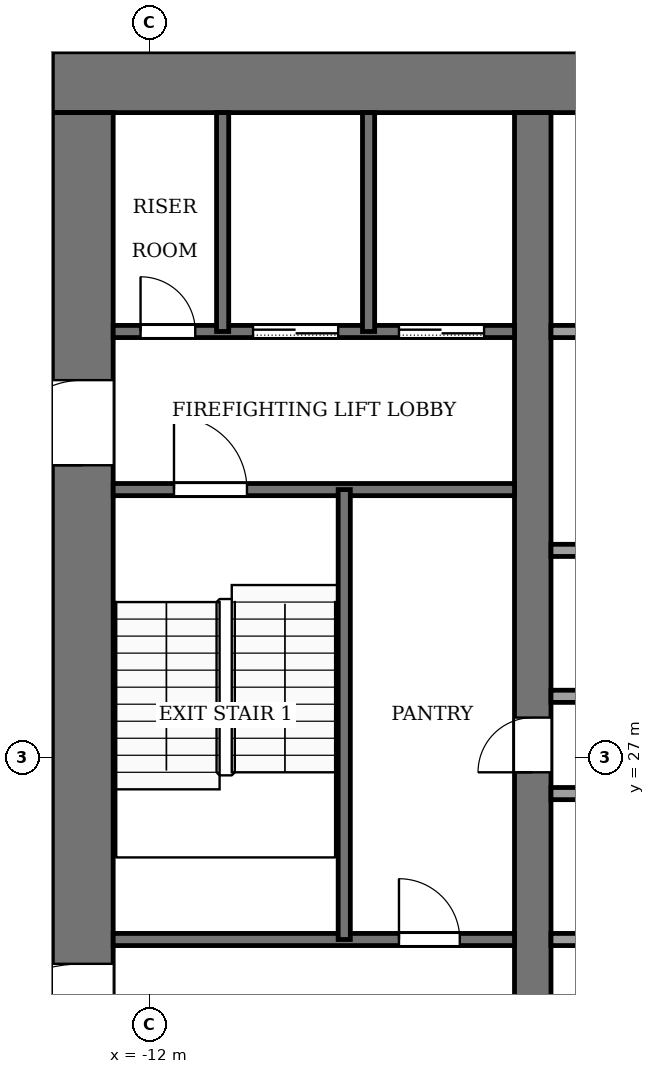
"""IFC4 building model, lengths in metres.
Left out: names, types, materials, properties, quantities, classifications, styles, units other than length and angle.
Written with IfcOpenShell. Run it as: python <this file> out.ifc"""

import sys

from ifc_helpers import new_model, si_unit, direction, frame, frame_2d, origin, place, context, subcontext, project, spatial, rectangle, extrude, element, fill, save


model = new_model("IFC4")
c1 = context("Model", 3, precision=1e-05, world=origin(), true_north=direction((0.0, 1.0)))
c2 = subcontext(c1, "Body", "Model", "MODEL_VIEW")
j1 = project(units=[si_unit("LENGTHUNIT", "METRE"), si_unit("PLANEANGLEUNIT", "RADIAN")], contexts=[c1])
p1 = place(None, origin())
s1 = spatial("IfcSite", under=j1, at=p1, CompositionType="ELEMENT")
p2 = place(p1, origin())
s2 = spatial("IfcBuilding", under=s1, at=p2, CompositionType="ELEMENT")
p3 = place(p2, frame((0.0, 0.0, 142.0)))
s3 = spatial("IfcBuildingStorey", under=s2, at=p3, CompositionType="ELEMENT", Elevation=142.0)
p4 = place(p3, frame((-13.6, 38.1, -0.13), z_axis=(0.0, 0.0, 1.0), x_axis=(1.0, 0.0, 0.0)))
e1 = element("IfcWall", 1, at=p4, inside=s3, PredefinedType="SHEAR", context=c2, shape_type="SweptSolid", body=[
    extrude(rectangle(XDim=27.2, YDim=1.0, at=frame_2d((13.6, 0.0))), origin(), (0.0, 0.0, 1.0), 4.0),
])
p5 = place(p3, frame((-13.1, 18.4, -0.13), z_axis=(0.0, 0.0, 1.0), x_axis=(0.0, 1.0, 0.0)))
e2 = element("IfcWall", 2, at=p5, inside=s3, PredefinedType="SHEAR", context=c2, shape_type="SweptSolid", body=[
    extrude(rectangle(XDim=19.2, YDim=1.0, at=frame_2d((9.6, 0.0))), origin(), (0.0, 0.0, 1.0), 4.0),
])
p6 = place(p5, frame((2.8, 0.0, 0.13)))
e3 = element("IfcOpeningElement", 3, at=p6, cuts=e2, PredefinedType="OPENING", context=c2, shape_type="SweptSolid", body=[
    extrude(rectangle(XDim=2.4, YDim=2.4, at=frame_2d((1.2, 1.2))), frame((0.0, 0.51, 0.0), z_axis=(0.0, -1.0, 0.0), x_axis=(1.0, 0.0, 0.0)), (0.0, 0.0, 1.0), 1.02),
])
p7 = place(p5, frame((13.4, 0.0, 0.13)))
e4 = element("IfcOpeningElement", 4, at=p7, cuts=e2, PredefinedType="OPENING", context=c2, shape_type="SweptSolid", body=[
    extrude(rectangle(XDim=1.4, YDim=2.2, at=frame_2d((0.7, 1.1))), frame((0.0, 0.51, 0.0), z_axis=(0.0, -1.0, 0.0), x_axis=(1.0, 0.0, 0.0)), (0.0, 0.0, 1.0), 1.02),
])
p8 = place(p3, frame((-5.7, 18.4, -0.13), z_axis=(0.0, 0.0, 1.0), x_axis=(0.0, 1.0, 0.0)))
e5 = element("IfcWall", 5, at=p8, inside=s3, PredefinedType="SHEAR", context=c2, shape_type="SweptSolid", body=[
    extrude(rectangle(XDim=19.2, YDim=0.6, at=frame_2d((9.6, 0.0))), origin(), (0.0, 0.0, 1.0), 4.0),
])
p9 = place(p8, frame((8.35, 0.0, 0.13)))
e6 = element("IfcOpeningElement", 6, at=p9, cuts=e5, PredefinedType="OPENING", context=c2, shape_type="SweptSolid", body=[
    extrude(rectangle(XDim=0.9, YDim=2.1, at=frame_2d((0.45, 1.05))), frame((0.0, 0.31, 0.0), z_axis=(0.0, -1.0, 0.0), x_axis=(1.0, 0.0, 0.0)), (0.0, 0.0, 1.0), 0.62),
])
p10 = place(p3, frame((-12.6, 24.0, 0.0), z_axis=(0.0, 0.0, 1.0), x_axis=(1.0, 0.0, 0.0)))
e7 = element("IfcWall", 7, at=p10, inside=s3, PredefinedType="PARTITIONING", context=c2, shape_type="SweptSolid", body=[
    extrude(rectangle(XDim=6.6, YDim=0.2, at=frame_2d((3.3, 0.0))), origin(), (0.0, 0.0, 1.0), 3.87),
])
p11 = place(p10, frame((4.7, 0.0, 0.0)))
e8 = element("IfcOpeningElement", 8, at=p11, cuts=e7, PredefinedType="OPENING", context=c2, shape_type="SweptSolid", body=[
    extrude(rectangle(XDim=1.0, YDim=2.1, at=frame_2d((0.5, 1.05))), frame((0.0, 0.11, 0.0), z_axis=(0.0, -1.0, 0.0), x_axis=(1.0, 0.0, 0.0)), (0.0, 0.0, 1.0), 0.22),
])
p12 = place(p3, frame((-5.4, 24.0, 0.0), z_axis=(0.0, 0.0, 1.0), x_axis=(1.0, 0.0, 0.0)))
e9 = element("IfcWall", 9, at=p12, inside=s3, PredefinedType="PARTITIONING", context=c2, shape_type="SweptSolid", body=[
    extrude(rectangle(XDim=10.8, YDim=0.2, at=frame_2d((5.4, 0.0))), origin(), (0.0, 0.0, 1.0), 3.87),
])
p13 = place(p12, frame((0.75, 0.0, 0.0)))
e10 = element("IfcOpeningElement", 10, at=p13, cuts=e9, PredefinedType="OPENING", context=c2, shape_type="SweptSolid", body=[
    extrude(rectangle(XDim=1.2, YDim=2.2, at=frame_2d((0.6, 1.1))), frame((0.0, 0.11, 0.0), z_axis=(0.0, -1.0, 0.0), x_axis=(1.0, 0.0, 0.0)), (0.0, 0.0, 1.0), 0.22),
])
p14 = place(p12, frame((3.45, 0.0, 0.0)))
e11 = element("IfcOpeningElement", 11, at=p14, cuts=e9, PredefinedType="OPENING", context=c2, shape_type="SweptSolid", body=[
    extrude(rectangle(XDim=1.2, YDim=2.2, at=frame_2d((0.6, 1.1))), frame((0.0, 0.11, 0.0), z_axis=(0.0, -1.0, 0.0), x_axis=(1.0, 0.0, 0.0)), (0.0, 0.0, 1.0), 0.22),
])
p15 = place(p12, frame((6.15, 0.0, 0.0)))
e12 = element("IfcOpeningElement", 12, at=p15, cuts=e9, PredefinedType="OPENING", context=c2, shape_type="SweptSolid", body=[
    extrude(rectangle(XDim=1.2, YDim=2.2, at=frame_2d((0.6, 1.1))), frame((0.0, 0.11, 0.0), z_axis=(0.0, -1.0, 0.0), x_axis=(1.0, 0.0, 0.0)), (0.0, 0.0, 1.0), 0.22),
])
p16 = place(p12, frame((8.85, 0.0, 0.0)))
e13 = element("IfcOpeningElement", 13, at=p16, cuts=e9, PredefinedType="OPENING", context=c2, shape_type="SweptSolid", body=[
    extrude(rectangle(XDim=1.2, YDim=2.2, at=frame_2d((0.6, 1.1))), frame((0.0, 0.11, 0.0), z_axis=(0.0, -1.0, 0.0), x_axis=(1.0, 0.0, 0.0)), (0.0, 0.0, 1.0), 0.22),
])
for number, where, z_axis, x_axis in (
    (14, (-5.4, 26.4, 0.0), (0.0, 0.0, 1.0), (1.0, 0.0, 0.0)),
    (15, (-5.4, 28.0, 0.0), (0.0, 0.0, 1.0), (1.0, 0.0, 0.0)),
    (16, (-5.4, 30.4, 0.0), (0.0, 0.0, 1.0), (1.0, 0.0, 0.0)),
):
    element("IfcWall", number, at=place(p3, frame(where, z_axis=z_axis, x_axis=x_axis)), inside=s3, PredefinedType="PARTITIONING", context=c2, shape_type="SweptSolid", body=[
        extrude(rectangle(XDim=10.8, YDim=0.2, at=frame_2d((5.4, 0.0))), origin(), (0.0, 0.0, 1.0), 3.87),
    ])
p17 = place(p3, frame((-12.6, 31.4, 0.0), z_axis=(0.0, 0.0, 1.0), x_axis=(1.0, 0.0, 0.0)))
e17 = element("IfcWall", 17, at=p17, inside=s3, PredefinedType="PARTITIONING", context=c2, shape_type="SweptSolid", body=[
    extrude(rectangle(XDim=6.6, YDim=0.2, at=frame_2d((3.3, 0.0))), origin(), (0.0, 0.0, 1.0), 3.87),
])
p18 = place(p17, frame((1.0, 0.0, 0.0)))
e18 = element("IfcOpeningElement", 18, at=p18, cuts=e17, PredefinedType="OPENING", context=c2, shape_type="SweptSolid", body=[
    extrude(rectangle(XDim=1.2, YDim=2.2, at=frame_2d((0.6, 1.1))), frame((0.0, 0.11, 0.0), z_axis=(0.0, -1.0, 0.0), x_axis=(1.0, 0.0, 0.0)), (0.0, 0.0, 1.0), 0.22),
])
p19 = place(p3, frame((-12.6, 34.0, 0.0), z_axis=(0.0, 0.0, 1.0), x_axis=(1.0, 0.0, 0.0)))
e19 = element("IfcWall", 19, at=p19, inside=s3, PredefinedType="PARTITIONING", context=c2, shape_type="SweptSolid", body=[
    extrude(rectangle(XDim=6.6, YDim=0.2, at=frame_2d((3.3, 0.0))), origin(), (0.0, 0.0, 1.0), 3.87),
])
p20 = place(p19, frame((4.7, 0.0, 0.0)))
e20 = element("IfcOpeningElement", 20, at=p20, cuts=e19, PredefinedType="OPENING", context=c2, shape_type="SweptSolid", body=[
    extrude(rectangle(XDim=1.4, YDim=2.2, at=frame_2d((0.7, 1.1))), frame((0.0, 0.11, 0.0), z_axis=(0.0, -1.0, 0.0), x_axis=(1.0, 0.0, 0.0)), (0.0, 0.0, 1.0), 0.22),
])
p21 = place(p19, frame((2.3, 0.0, 0.0)))
e21 = element("IfcOpeningElement", 21, at=p21, cuts=e19, PredefinedType="OPENING", context=c2, shape_type="SweptSolid", body=[
    extrude(rectangle(XDim=1.4, YDim=2.2, at=frame_2d((0.7, 1.1))), frame((0.0, 0.11, 0.0), z_axis=(0.0, -1.0, 0.0), x_axis=(1.0, 0.0, 0.0)), (0.0, 0.0, 1.0), 0.22),
])
p22 = place(p19, frame((0.45, 0.0, 0.0)))
e22 = element("IfcOpeningElement", 22, at=p22, cuts=e19, PredefinedType="OPENING", context=c2, shape_type="SweptSolid", body=[
    extrude(rectangle(XDim=0.9, YDim=2.1, at=frame_2d((0.45, 1.05))), frame((0.0, 0.11, 0.0), z_axis=(0.0, -1.0, 0.0), x_axis=(1.0, 0.0, 0.0)), (0.0, 0.0, 1.0), 0.22),
])
p23 = place(p3, frame((-5.4, 34.0, 0.0), z_axis=(0.0, 0.0, 1.0), x_axis=(1.0, 0.0, 0.0)))
e23 = element("IfcWall", 23, at=p23, inside=s3, PredefinedType="PARTITIONING", context=c2, shape_type="SweptSolid", body=[
    extrude(rectangle(XDim=10.8, YDim=0.2, at=frame_2d((5.4, 0.0))), origin(), (0.0, 0.0, 1.0), 3.87),
])
p24 = place(p23, frame((6.15, 0.0, 0.0)))
e24 = element("IfcOpeningElement", 24, at=p24, cuts=e23, PredefinedType="OPENING", context=c2, shape_type="SweptSolid", body=[
    extrude(rectangle(XDim=1.2, YDim=2.2, at=frame_2d((0.6, 1.1))), frame((0.0, 0.11, 0.0), z_axis=(0.0, -1.0, 0.0), x_axis=(1.0, 0.0, 0.0)), (0.0, 0.0, 1.0), 0.22),
])
p25 = place(p23, frame((8.95, 0.0, 0.0)))
e25 = element("IfcOpeningElement", 25, at=p25, cuts=e23, PredefinedType="OPENING", context=c2, shape_type="SweptSolid", body=[
    extrude(rectangle(XDim=1.0, YDim=2.1, at=frame_2d((0.5, 1.05))), frame((0.0, 0.11, 0.0), z_axis=(0.0, -1.0, 0.0), x_axis=(1.0, 0.0, 0.0)), (0.0, 0.0, 1.0), 0.22),
])
p26 = place(p3, frame((-10.8, 34.0, 0.0), z_axis=(0.0, 0.0, 1.0), x_axis=(0.0, 1.0, 0.0)))
e26 = element("IfcWall", 26, at=p26, inside=s3, PredefinedType="PARTITIONING", context=c2, shape_type="SweptSolid", body=[
    extrude(rectangle(XDim=3.6, YDim=0.2, at=frame_2d((1.8, 0.0))), origin(), (0.0, 0.0, 1.0), 3.87),
])
p27 = place(p3, frame((-8.8, 24.0, 0.0), z_axis=(0.0, 0.0, 1.0), x_axis=(0.0, 1.0, 0.0)))
e27 = element("IfcWall", 27, at=p27, inside=s3, PredefinedType="PARTITIONING", context=c2, shape_type="SweptSolid", body=[
    extrude(rectangle(XDim=7.4, YDim=0.2, at=frame_2d((3.7, 0.0))), origin(), (0.0, 0.0, 1.0), 3.87),
])
p28 = place(p3, frame((-8.4, 34.0, 0.0), z_axis=(0.0, 0.0, 1.0), x_axis=(0.0, 1.0, 0.0)))
e28 = element("IfcWall", 28, at=p28, inside=s3, PredefinedType="PARTITIONING", context=c2, shape_type="SweptSolid", body=[
    extrude(rectangle(XDim=3.6, YDim=0.2, at=frame_2d((1.8, 0.0))), origin(), (0.0, 0.0, 1.0), 3.87),
])
p29 = place(p20, origin())
e29 = element("IfcDoor", 29, at=p29, inside=s3, OperationType="SLIDING_TO_LEFT", PredefinedType="DOOR", context=c2, shape_type="SweptSolid", body=[
    extrude(rectangle(XDim=1.4, YDim=2.2, at=frame_2d((0.7, 1.1))), frame((0.0, 0.025, 0.0), z_axis=(0.0, -1.0, 0.0), x_axis=(1.0, 0.0, 0.0)), (0.0, 0.0, 1.0), 0.05),
])
fill(e20, e29)
p30 = place(p21, origin())
e30 = element("IfcDoor", 30, at=p30, inside=s3, OperationType="SLIDING_TO_LEFT", PredefinedType="DOOR", context=c2, shape_type="SweptSolid", body=[
    extrude(rectangle(XDim=1.4, YDim=2.2, at=frame_2d((0.7, 1.1))), frame((0.0, 0.025, 0.0), z_axis=(0.0, -1.0, 0.0), x_axis=(1.0, 0.0, 0.0)), (0.0, 0.0, 1.0), 0.05),
])
fill(e21, e30)
p31 = place(p22, origin())
e31 = element("IfcDoor", 31, at=p31, inside=s3, OperationType="SINGLE_SWING_RIGHT", PredefinedType="DOOR", context=c2, shape_type="SweptSolid", body=[
    extrude(rectangle(XDim=0.9, YDim=2.1, at=frame_2d((0.45, 1.05))), frame((0.0, 0.025, 0.0), z_axis=(0.0, -1.0, 0.0), x_axis=(1.0, 0.0, 0.0)), (0.0, 0.0, 1.0), 0.05),
])
fill(e22, e31)
p32 = place(p11, origin())
e32 = element("IfcDoor", 32, at=p32, inside=s3, OperationType="SINGLE_SWING_RIGHT", PredefinedType="DOOR", context=c2, shape_type="SweptSolid", body=[
    extrude(rectangle(XDim=1.0, YDim=2.1, at=frame_2d((0.5, 1.05))), frame((0.0, 0.025, 0.0), z_axis=(0.0, -1.0, 0.0), x_axis=(1.0, 0.0, 0.0)), (0.0, 0.0, 1.0), 0.05),
])
fill(e8, e32)
p33 = place(p9, origin())
e33 = element("IfcDoor", 33, at=p33, inside=s3, OperationType="SINGLE_SWING_LEFT", PredefinedType="DOOR", context=c2, shape_type="SweptSolid", body=[
    extrude(rectangle(XDim=0.9, YDim=2.1, at=frame_2d((0.45, 1.05))), frame((0.0, 0.025, 0.0), z_axis=(0.0, -1.0, 0.0), x_axis=(1.0, 0.0, 0.0)), (0.0, 0.0, 1.0), 0.05),
])
fill(e6, e33)
p34 = place(p18, origin())
e34 = element("IfcDoor", 34, at=p34, inside=s3, OperationType="SINGLE_SWING_LEFT", PredefinedType="DOOR", context=c2, shape_type="SweptSolid", body=[
    extrude(rectangle(XDim=1.2, YDim=2.2, at=frame_2d((0.6, 1.1))), frame((0.0, 0.025, 0.0), z_axis=(0.0, -1.0, 0.0), x_axis=(1.0, 0.0, 0.0)), (0.0, 0.0, 1.0), 0.05),
])
fill(e18, e34)
p35 = place(p6, origin())
e35 = element("IfcDoor", 35, at=p35, inside=s3, OperationType="DOUBLE_DOOR_SINGLE_SWING", PredefinedType="DOOR", context=c2, shape_type="SweptSolid", body=[
    extrude(rectangle(XDim=2.4, YDim=2.4, at=frame_2d((1.2, 1.2))), frame((0.0, 0.025, 0.0), z_axis=(0.0, -1.0, 0.0), x_axis=(1.0, 0.0, 0.0)), (0.0, 0.0, 1.0), 0.05),
])
fill(e3, e35)
p36 = place(p7, origin())
e36 = element("IfcDoor", 36, at=p36, inside=s3, OperationType="SINGLE_SWING_LEFT", PredefinedType="DOOR", context=c2, shape_type="SweptSolid", body=[
    extrude(rectangle(XDim=1.4, YDim=2.2, at=frame_2d((0.7, 1.1))), frame((0.0, 0.025, 0.0), z_axis=(0.0, -1.0, 0.0), x_axis=(1.0, 0.0, 0.0)), (0.0, 0.0, 1.0), 0.05),
])
fill(e4, e36)
save(model, sys.argv[1])
